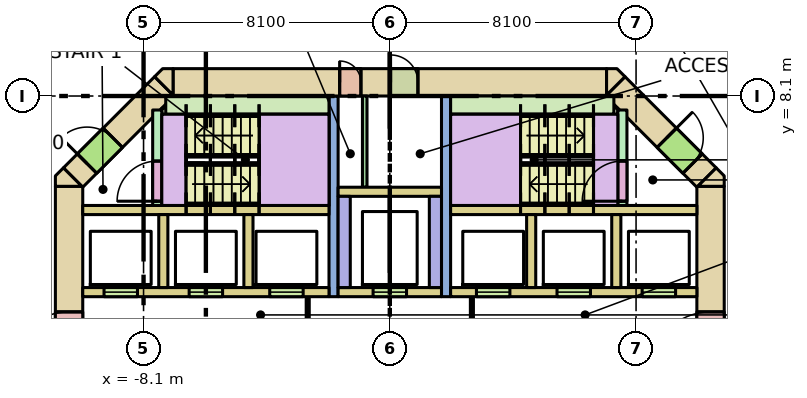
"""IFC4 building model, lengths in metres.
Left out: names, types, materials, properties, quantities, classifications, styles, units other than length and angle.
Written with IfcOpenShell. Run it as: python <this file> out.ifc"""

import sys

from ifc_helpers import new_model, si_unit, direction, frame, frame_2d, origin, place, context, subcontext, project, spatial, polyline, rectangle, outline, extrude, element, fill, save


model = new_model("IFC4")
c1 = context("Model", 3, precision=1e-05, world=origin(), true_north=direction((0.0, 1.0)))
c2 = subcontext(c1, "Body", "Model", "MODEL_VIEW")
j1 = project(units=[si_unit("LENGTHUNIT", "METRE"), si_unit("PLANEANGLEUNIT", "RADIAN")], contexts=[c1])
p1 = place(None, origin())
s1 = spatial("IfcSite", under=j1, at=p1, CompositionType="ELEMENT")
p2 = place(p1, origin())
s2 = spatial("IfcBuilding", under=s1, at=p2, CompositionType="ELEMENT")
p3 = place(p2, origin())
s3 = spatial("IfcBuildingStorey", under=s2, at=p3, CompositionType="ELEMENT", Elevation=0.0)
p4 = place(p3, frame((-7.13, 8.55, -0.32), z_axis=(0.0, 0.0, 1.0), x_axis=(1.0, 0.0, 0.0)))
e1 = element("IfcWall", 1, at=p4, inside=s3, PredefinedType="SHEAR", context=c2, shape_type="SweptSolid", body=[
    extrude(rectangle(XDim=14.26, YDim=0.9, at=frame_2d((7.13, 0.0))), origin(), (0.0, 0.0, 1.0), 6.0),
])
p5 = place(p4, frame((5.48, 0.0, 0.32)))
e2 = element("IfcOpeningElement", 2, at=p5, cuts=e1, PredefinedType="OPENING", context=c2, shape_type="SweptSolid", body=[
    extrude(rectangle(XDim=0.7, YDim=2.1, at=frame_2d((0.35, 1.05))), frame((0.0, 0.46, 0.0), z_axis=(0.0, -1.0, 0.0), x_axis=(1.0, 0.0, 0.0)), (0.0, 0.0, 1.0), 0.92),
])
p6 = place(p4, frame((7.155, 0.0, 0.32)))
e3 = element("IfcOpeningElement", 3, at=p6, cuts=e1, PredefinedType="OPENING", context=c2, shape_type="SweptSolid", body=[
    extrude(rectangle(XDim=0.9, YDim=2.1, at=frame_2d((0.45, 1.05))), frame((0.0, 0.46, 0.0), z_axis=(0.0, -1.0, 0.0), x_axis=(1.0, 0.0, 0.0)), (0.0, 0.0, 1.0), 0.92),
])
p7 = place(p3, frame((-10.55, -5.13, -0.32), z_axis=(0.0, 0.0, 1.0), x_axis=(0.0, 1.0, 0.0)))
e4 = element("IfcWall", 4, at=p7, inside=s3, PredefinedType="SHEAR", context=c2, shape_type="SweptSolid", body=[
    extrude(rectangle(XDim=10.26, YDim=0.9, at=frame_2d((5.13, 0.0))), origin(), (0.0, 0.0, 1.0), 6.0),
])
p8 = place(p7, frame((4.13, 0.0, 0.32)))
e5 = element("IfcOpeningElement", 5, at=p8, cuts=e4, PredefinedType="OPENING", context=c2, shape_type="SweptSolid", body=[
    extrude(rectangle(XDim=2.0, YDim=2.1, at=frame_2d((1.0, 1.05))), frame((0.0, 0.46, 0.0), z_axis=(0.0, -1.0, 0.0), x_axis=(1.0, 0.0, 0.0)), (0.0, 0.0, 1.0), 0.92),
])
p9 = place(p3, frame((10.55, -5.13, -0.32), z_axis=(0.0, 0.0, 1.0), x_axis=(0.0, 1.0, 0.0)))
e6 = element("IfcWall", 6, at=p9, inside=s3, PredefinedType="SHEAR", context=c2, shape_type="SweptSolid", body=[
    extrude(rectangle(XDim=10.26, YDim=0.9, at=frame_2d((5.13, 0.0))), origin(), (0.0, 0.0, 1.0), 6.0),
])
p10 = place(p9, frame((4.13, 0.0, 0.32)))
e7 = element("IfcOpeningElement", 7, at=p10, cuts=e6, PredefinedType="OPENING", context=c2, shape_type="SweptSolid", body=[
    extrude(rectangle(XDim=2.0, YDim=2.1, at=frame_2d((1.0, 1.05))), frame((0.0, 0.46, 0.0), z_axis=(0.0, -1.0, 0.0), x_axis=(1.0, 0.0, 0.0)), (0.0, 0.0, 1.0), 0.92),
])
p11 = place(p3, frame((-10.418, 5.418, -0.32), z_axis=(0.0, 0.0, 1.0), x_axis=(0.707106781187, 0.707106781187, 0.0)))
e8 = element("IfcWall", 8, at=p11, inside=s3, PredefinedType="SHEAR", context=c2, shape_type="SweptSolid", body=[
    extrude(rectangle(XDim=4.243, YDim=0.9, at=frame_2d((2.121, 0.0))), origin(), (0.0, 0.0, 1.0), 6.0),
])
p12 = place(p11, frame((0.65, 0.0, 0.32)))
e9 = element("IfcOpeningElement", 9, at=p12, cuts=e8, PredefinedType="OPENING", context=c2, shape_type="SweptSolid", body=[
    extrude(rectangle(XDim=1.2, YDim=2.1, at=frame_2d((0.6, 1.05))), frame((0.0, 0.46, 0.0), z_axis=(0.0, -1.0, 0.0), x_axis=(1.0, 0.0, 0.0)), (0.0, 0.0, 1.0), 0.92),
])
p13 = place(p3, frame((7.418, 8.418, -0.32), z_axis=(0.0, 0.0, 1.0), x_axis=(0.707106781187, -0.707106781187, 0.0)))
e10 = element("IfcWall", 10, at=p13, inside=s3, PredefinedType="SHEAR", context=c2, shape_type="SweptSolid", body=[
    extrude(rectangle(XDim=4.243, YDim=0.9, at=frame_2d((2.121, 0.0))), origin(), (0.0, 0.0, 1.0), 6.0),
])
p14 = place(p13, frame((2.393, 0.0, 0.32)))
e11 = element("IfcOpeningElement", 11, at=p14, cuts=e10, PredefinedType="OPENING", context=c2, shape_type="SweptSolid", body=[
    extrude(rectangle(XDim=1.2, YDim=2.1, at=frame_2d((0.6, 1.05))), frame((0.0, 0.46, 0.0), z_axis=(0.0, -1.0, 0.0), x_axis=(1.0, 0.0, 0.0)), (0.0, 0.0, 1.0), 0.92),
])
p15 = place(p3, frame((0.0, 0.0, -0.32)))
e12 = element("IfcWall", 12, at=p15, inside=s3, PredefinedType="SHEAR", context=c2, shape_type="SweptSolid", body=[
    extrude(outline(polyline([(-10.736, 5.736), (-10.13, 5.13), (-11.0, 5.13), (-11.0, 5.473), (-10.736, 5.736)])), origin(), (0.0, 0.0, 1.0), 6.0),
])
p16 = place(p3, frame((0.0, 0.0, -0.32)))
e13 = element("IfcWall", 13, at=p16, inside=s3, PredefinedType="SHEAR", context=c2, shape_type="SweptSolid", body=[
    extrude(outline(polyline([(11.0, 5.473), (11.0, 5.13), (10.13, 5.13), (10.736, 5.736), (11.0, 5.473)])), origin(), (0.0, 0.0, 1.0), 6.0),
])
p17 = place(p3, frame((0.0, 0.0, -0.32)))
e14 = element("IfcWall", 14, at=p17, inside=s3, PredefinedType="SHEAR", context=c2, shape_type="SweptSolid", body=[
    extrude(outline(polyline([(-7.473, 9.0), (-7.13, 9.0), (-7.13, 8.13), (-7.736, 8.736), (-7.473, 9.0)])), origin(), (0.0, 0.0, 1.0), 6.0),
])
p18 = place(p3, frame((0.0, 0.0, -0.32)))
e15 = element("IfcWall", 15, at=p18, inside=s3, PredefinedType="SHEAR", context=c2, shape_type="SweptSolid", body=[
    extrude(outline(polyline([(7.473, 9.0), (7.736, 8.736), (7.13, 8.13), (7.13, 9.0), (7.473, 9.0)])), origin(), (0.0, 0.0, 1.0), 6.0),
])
for number, where, z_axis, x_axis in (
    (16, (-10.1, 4.35, 0.0), (0.0, 0.0, 1.0), (1.0, 0.0, 0.0)),
    (17, (2.0, 4.35, 0.0), (0.0, 0.0, 1.0), (1.0, 0.0, 0.0)),
):
    element("IfcWall", number, at=place(p3, frame(where, z_axis=z_axis, x_axis=x_axis)), inside=s3, PredefinedType="SOLIDWALL", context=c2, shape_type="SweptSolid", body=[
        extrude(rectangle(XDim=8.1, YDim=0.3, at=frame_2d((4.05, 0.0))), origin(), (0.0, 0.0, 1.0), 5.68),
    ])
p19 = place(p3, frame((-10.1, 1.65, 0.0), z_axis=(0.0, 0.0, 1.0), x_axis=(1.0, 0.0, 0.0)))
e18 = element("IfcWall", 18, at=p19, inside=s3, PredefinedType="SOLIDWALL", context=c2, shape_type="SweptSolid", body=[
    extrude(rectangle(XDim=8.1, YDim=0.3, at=frame_2d((4.05, 0.0))), origin(), (0.0, 0.0, 1.0), 5.68),
])
p20 = place(p19, frame((0.7, 0.0, 0.0)))
e19 = element("IfcOpeningElement", 19, at=p20, cuts=e18, PredefinedType="OPENING", context=c2, shape_type="SweptSolid", body=[
    extrude(rectangle(XDim=1.1, YDim=2.1, at=frame_2d((0.55, 1.05))), frame((0.0, 0.16, 0.0), z_axis=(0.0, -1.0, 0.0), x_axis=(1.0, 0.0, 0.0)), (0.0, 0.0, 1.0), 0.32),
])
p21 = place(p19, frame((3.5, 0.0, 0.0)))
e20 = element("IfcOpeningElement", 20, at=p21, cuts=e18, PredefinedType="OPENING", context=c2, shape_type="SweptSolid", body=[
    extrude(rectangle(XDim=1.1, YDim=2.1, at=frame_2d((0.55, 1.05))), frame((0.0, 0.16, 0.0), z_axis=(0.0, -1.0, 0.0), x_axis=(1.0, 0.0, 0.0)), (0.0, 0.0, 1.0), 0.32),
])
p22 = place(p19, frame((6.15, 0.0, 0.0)))
e21 = element("IfcOpeningElement", 21, at=p22, cuts=e18, PredefinedType="OPENING", context=c2, shape_type="SweptSolid", body=[
    extrude(rectangle(XDim=1.1, YDim=2.1, at=frame_2d((0.55, 1.05))), frame((0.0, 0.16, 0.0), z_axis=(0.0, -1.0, 0.0), x_axis=(1.0, 0.0, 0.0)), (0.0, 0.0, 1.0), 0.32),
])
p23 = place(p3, frame((2.0, 1.65, 0.0), z_axis=(0.0, 0.0, 1.0), x_axis=(1.0, 0.0, 0.0)))
e22 = element("IfcWall", 22, at=p23, inside=s3, PredefinedType="SOLIDWALL", context=c2, shape_type="SweptSolid", body=[
    extrude(rectangle(XDim=8.1, YDim=0.3, at=frame_2d((4.05, 0.0))), origin(), (0.0, 0.0, 1.0), 5.68),
])
p24 = place(p23, frame((0.85, 0.0, 0.0)))
e23 = element("IfcOpeningElement", 23, at=p24, cuts=e22, PredefinedType="OPENING", context=c2, shape_type="SweptSolid", body=[
    extrude(rectangle(XDim=1.1, YDim=2.1, at=frame_2d((0.55, 1.05))), frame((0.0, 0.16, 0.0), z_axis=(0.0, -1.0, 0.0), x_axis=(1.0, 0.0, 0.0)), (0.0, 0.0, 1.0), 0.32),
])
p25 = place(p23, frame((3.5, 0.0, 0.0)))
e24 = element("IfcOpeningElement", 24, at=p25, cuts=e22, PredefinedType="OPENING", context=c2, shape_type="SweptSolid", body=[
    extrude(rectangle(XDim=1.1, YDim=2.1, at=frame_2d((0.55, 1.05))), frame((0.0, 0.16, 0.0), z_axis=(0.0, -1.0, 0.0), x_axis=(1.0, 0.0, 0.0)), (0.0, 0.0, 1.0), 0.32),
])
p26 = place(p23, frame((6.3, 0.0, 0.0)))
e25 = element("IfcOpeningElement", 25, at=p26, cuts=e22, PredefinedType="OPENING", context=c2, shape_type="SweptSolid", body=[
    extrude(rectangle(XDim=1.1, YDim=2.1, at=frame_2d((0.55, 1.05))), frame((0.0, 0.16, 0.0), z_axis=(0.0, -1.0, 0.0), x_axis=(1.0, 0.0, 0.0)), (0.0, 0.0, 1.0), 0.32),
])
for number, where, z_axis, x_axis in (
    (26, (-7.45, 1.8, 0.0), (0.0, 0.0, 1.0), (0.0, 1.0, 0.0)),
    (27, (-4.65, 1.8, 0.0), (0.0, 0.0, 1.0), (0.0, 1.0, 0.0)),
    (28, (4.65, 1.8, 0.0), (0.0, 0.0, 1.0), (0.0, 1.0, 0.0)),
    (29, (7.45, 1.8, 0.0), (0.0, 0.0, 1.0), (0.0, 1.0, 0.0)),
):
    element("IfcWall", number, at=place(p3, frame(where, z_axis=z_axis, x_axis=x_axis)), inside=s3, PredefinedType="SOLIDWALL", context=c2, shape_type="SweptSolid", body=[
        extrude(rectangle(XDim=2.4, YDim=0.3, at=frame_2d((1.2, 0.0))), origin(), (0.0, 0.0, 1.0), 5.68),
    ])
for number, where, z_axis, x_axis in (
    (30, (-1.85, 1.5, 0.0), (0.0, 0.0, 1.0), (0.0, 1.0, 0.0)),
    (31, (1.85, 1.5, 0.0), (0.0, 0.0, 1.0), (0.0, 1.0, 0.0)),
):
    element("IfcWall", number, at=place(p3, frame(where, z_axis=z_axis, x_axis=x_axis)), inside=s3, PredefinedType="SHEAR", context=c2, shape_type="SweptSolid", body=[
        extrude(rectangle(XDim=6.6, YDim=0.3, at=frame_2d((3.3, 0.0))), origin(), (0.0, 0.0, 1.0), 5.68),
    ])
p27 = place(p3, frame((-1.7, 1.65, 0.0), z_axis=(0.0, 0.0, 1.0), x_axis=(1.0, 0.0, 0.0)))
e32 = element("IfcWall", 32, at=p27, inside=s3, PredefinedType="SOLIDWALL", context=c2, shape_type="SweptSolid", body=[
    extrude(rectangle(XDim=3.4, YDim=0.3, at=frame_2d((1.7, 0.0))), origin(), (0.0, 0.0, 1.0), 5.68),
])
p28 = place(p27, frame((1.15, 0.0, 0.0)))
e33 = element("IfcOpeningElement", 33, at=p28, cuts=e32, PredefinedType="OPENING", context=c2, shape_type="SweptSolid", body=[
    extrude(rectangle(XDim=1.1, YDim=2.1, at=frame_2d((0.55, 1.05))), frame((0.0, 0.16, 0.0), z_axis=(0.0, -1.0, 0.0), x_axis=(1.0, 0.0, 0.0)), (0.0, 0.0, 1.0), 0.32),
])
for number, where, z_axis, x_axis in (
    (34, (-1.5, 1.8, 0.0), (0.0, 0.0, 1.0), (0.0, 1.0, 0.0)),
    (35, (1.5, 1.8, 0.0), (0.0, 0.0, 1.0), (0.0, 1.0, 0.0)),
):
    element("IfcWall", number, at=place(p3, frame(where, z_axis=z_axis, x_axis=x_axis)), inside=s3, PredefinedType="SOLIDWALL", context=c2, shape_type="SweptSolid", body=[
        extrude(rectangle(XDim=3.0, YDim=0.4, at=frame_2d((1.5, 0.0))), origin(), (0.0, 0.0, 1.0), 5.68),
    ])
p29 = place(p3, frame((-1.7, 4.95, 0.0), z_axis=(0.0, 0.0, 1.0), x_axis=(1.0, 0.0, 0.0)))
e36 = element("IfcWall", 36, at=p29, inside=s3, PredefinedType="SOLIDWALL", context=c2, shape_type="SweptSolid", body=[
    extrude(rectangle(XDim=3.4, YDim=0.3, at=frame_2d((1.7, 0.0))), origin(), (0.0, 0.0, 1.0), 5.68),
])
p30 = place(p3, frame((-7.65, 4.5, 0.0), z_axis=(0.0, 0.0, 1.0), x_axis=(0.0, 1.0, 0.0)))
e37 = element("IfcWall", 37, at=p30, inside=s3, PredefinedType="SHEAR", context=c2, shape_type="SweptSolid", body=[
    extrude(rectangle(XDim=3.14, YDim=0.3, at=frame_2d((1.57, 0.0))), origin(), (0.0, 0.0, 1.0), 5.68),
])
p31 = place(p30, frame((0.14, 0.0, 0.0)))
e38 = element("IfcOpeningElement", 38, at=p31, cuts=e37, PredefinedType="OPENING", context=c2, shape_type="SweptSolid", body=[
    extrude(rectangle(XDim=1.32, YDim=2.1, at=frame_2d((0.66, 1.05))), frame((0.0, 0.16, 0.0), z_axis=(0.0, -1.0, 0.0), x_axis=(1.0, 0.0, 0.0)), (0.0, 0.0, 1.0), 0.32),
])
p32 = place(p3, frame((-7.37, 7.8, 0.0), z_axis=(0.0, 0.0, 1.0), x_axis=(1.0, 0.0, 0.0)))
e39 = element("IfcWall", 39, at=p32, inside=s3, PredefinedType="SHEAR", context=c2, shape_type="SweptSolid", body=[
    extrude(rectangle(XDim=5.37, YDim=0.6, at=frame_2d((2.685, 0.0))), origin(), (0.0, 0.0, 1.0), 5.68),
])
p33 = place(p3, frame((7.65, 4.5, 0.0), z_axis=(0.0, 0.0, 1.0), x_axis=(0.0, 1.0, 0.0)))
e40 = element("IfcWall", 40, at=p33, inside=s3, PredefinedType="SHEAR", context=c2, shape_type="SweptSolid", body=[
    extrude(rectangle(XDim=3.14, YDim=0.3, at=frame_2d((1.57, 0.0))), origin(), (0.0, 0.0, 1.0), 5.68),
])
p34 = place(p33, frame((0.14, 0.0, 0.0)))
e41 = element("IfcOpeningElement", 41, at=p34, cuts=e40, PredefinedType="OPENING", context=c2, shape_type="SweptSolid", body=[
    extrude(rectangle(XDim=1.32, YDim=2.1, at=frame_2d((0.66, 1.05))), frame((0.0, 0.16, 0.0), z_axis=(0.0, -1.0, 0.0), x_axis=(1.0, 0.0, 0.0)), (0.0, 0.0, 1.0), 0.32),
])
p35 = place(p3, frame((2.0, 7.8, 0.0), z_axis=(0.0, 0.0, 1.0), x_axis=(1.0, 0.0, 0.0)))
e42 = element("IfcWall", 42, at=p35, inside=s3, PredefinedType="SHEAR", context=c2, shape_type="SweptSolid", body=[
    extrude(rectangle(XDim=5.37, YDim=0.6, at=frame_2d((2.685, 0.0))), origin(), (0.0, 0.0, 1.0), 5.68),
])
for number, where, z_axis, x_axis in (
    (43, (-7.5, 7.6, 0.0), (0.0, 0.0, 1.0), (1.0, 0.0, 0.0)),
    (44, (6.9, 7.6, 0.0), (0.0, 0.0, 1.0), (1.0, 0.0, 0.0)),
):
    element("IfcWall", number, at=place(p3, frame(where, z_axis=z_axis, x_axis=x_axis)), inside=s3, PredefinedType="SHEAR", context=c2, shape_type="SweptSolid", body=[
        extrude(rectangle(XDim=0.6, YDim=0.2, at=frame_2d((0.3, 0.0))), origin(), (0.0, 0.0, 1.0), 5.68),
    ])
p36 = place(p3, frame((-2.7, -1.5, 0.0), z_axis=(0.0, 0.0, 1.0), x_axis=(0.0, 1.0, 0.0)))
e45 = element("IfcWall", 45, at=p36, inside=s3, PredefinedType="PARTITIONING", context=c2, shape_type="SweptSolid", body=[
    extrude(rectangle(XDim=3.0, YDim=0.1, at=frame_2d((1.5, 0.0))), origin(), (0.0, 0.0, 1.0), 5.68),
])
p37 = place(p36, frame((0.9, 0.0, 0.0)))
e46 = element("IfcOpeningElement", 46, at=p37, cuts=e45, PredefinedType="OPENING", context=c2, shape_type="SweptSolid", body=[
    extrude(rectangle(XDim=1.2, YDim=2.1, at=frame_2d((0.6, 1.05))), frame((0.0, 0.06, 0.0), z_axis=(0.0, -1.0, 0.0), x_axis=(1.0, 0.0, 0.0)), (0.0, 0.0, 1.0), 0.12),
])
p38 = place(p3, frame((2.7, -1.5, 0.0), z_axis=(0.0, 0.0, 1.0), x_axis=(0.0, 1.0, 0.0)))
e47 = element("IfcWall", 47, at=p38, inside=s3, PredefinedType="PARTITIONING", context=c2, shape_type="SweptSolid", body=[
    extrude(rectangle(XDim=3.0, YDim=0.1, at=frame_2d((1.5, 0.0))), origin(), (0.0, 0.0, 1.0), 5.68),
])
p39 = place(p38, frame((0.9, 0.0, 0.0)))
e48 = element("IfcOpeningElement", 48, at=p39, cuts=e47, PredefinedType="OPENING", context=c2, shape_type="SweptSolid", body=[
    extrude(rectangle(XDim=1.2, YDim=2.1, at=frame_2d((0.6, 1.05))), frame((0.0, 0.06, 0.0), z_axis=(0.0, -1.0, 0.0), x_axis=(1.0, 0.0, 0.0)), (0.0, 0.0, 1.0), 0.12),
])
p40 = place(p3, frame((-0.825, 5.1, 0.0), z_axis=(0.0, 0.0, 1.0), x_axis=(0.0, 1.0, 0.0)))
e49 = element("IfcWall", 49, at=p40, inside=s3, PredefinedType="PARTITIONING", context=c2, shape_type="SweptSolid", body=[
    extrude(rectangle(XDim=3.0, YDim=0.15, at=frame_2d((1.5, 0.0))), origin(), (0.0, 0.0, 1.0), 5.68),
])
p41 = place(p20, origin())
e50 = element("IfcDoor", 50, at=p41, inside=s3, OperationType="DOUBLE_DOOR_SLIDING", PredefinedType="DOOR", context=c2, shape_type="SweptSolid", body=[
    extrude(rectangle(XDim=1.1, YDim=2.1, at=frame_2d((0.55, 1.05))), frame((0.0, 0.025, 0.0), z_axis=(0.0, -1.0, 0.0), x_axis=(1.0, 0.0, 0.0)), (0.0, 0.0, 1.0), 0.05),
])
fill(e19, e50)
p42 = place(p21, origin())
e51 = element("IfcDoor", 51, at=p42, inside=s3, OperationType="DOUBLE_DOOR_SLIDING", PredefinedType="DOOR", context=c2, shape_type="SweptSolid", body=[
    extrude(rectangle(XDim=1.1, YDim=2.1, at=frame_2d((0.55, 1.05))), frame((0.0, 0.025, 0.0), z_axis=(0.0, -1.0, 0.0), x_axis=(1.0, 0.0, 0.0)), (0.0, 0.0, 1.0), 0.05),
])
fill(e20, e51)
p43 = place(p22, origin())
e52 = element("IfcDoor", 52, at=p43, inside=s3, OperationType="DOUBLE_DOOR_SLIDING", PredefinedType="DOOR", context=c2, shape_type="SweptSolid", body=[
    extrude(rectangle(XDim=1.1, YDim=2.1, at=frame_2d((0.55, 1.05))), frame((0.0, 0.025, 0.0), z_axis=(0.0, -1.0, 0.0), x_axis=(1.0, 0.0, 0.0)), (0.0, 0.0, 1.0), 0.05),
])
fill(e21, e52)
p44 = place(p24, origin())
e53 = element("IfcDoor", 53, at=p44, inside=s3, OperationType="DOUBLE_DOOR_SLIDING", PredefinedType="DOOR", context=c2, shape_type="SweptSolid", body=[
    extrude(rectangle(XDim=1.1, YDim=2.1, at=frame_2d((0.55, 1.05))), frame((0.0, 0.025, 0.0), z_axis=(0.0, -1.0, 0.0), x_axis=(1.0, 0.0, 0.0)), (0.0, 0.0, 1.0), 0.05),
])
fill(e23, e53)
p45 = place(p25, origin())
e54 = element("IfcDoor", 54, at=p45, inside=s3, OperationType="DOUBLE_DOOR_SLIDING", PredefinedType="DOOR", context=c2, shape_type="SweptSolid", body=[
    extrude(rectangle(XDim=1.1, YDim=2.1, at=frame_2d((0.55, 1.05))), frame((0.0, 0.025, 0.0), z_axis=(0.0, -1.0, 0.0), x_axis=(1.0, 0.0, 0.0)), (0.0, 0.0, 1.0), 0.05),
])
fill(e24, e54)
p46 = place(p26, origin())
e55 = element("IfcDoor", 55, at=p46, inside=s3, OperationType="DOUBLE_DOOR_SLIDING", PredefinedType="DOOR", context=c2, shape_type="SweptSolid", body=[
    extrude(rectangle(XDim=1.1, YDim=2.1, at=frame_2d((0.55, 1.05))), frame((0.0, 0.025, 0.0), z_axis=(0.0, -1.0, 0.0), x_axis=(1.0, 0.0, 0.0)), (0.0, 0.0, 1.0), 0.05),
])
fill(e25, e55)
p47 = place(p28, origin())
e56 = element("IfcDoor", 56, at=p47, inside=s3, OperationType="DOUBLE_DOOR_SLIDING", PredefinedType="DOOR", context=c2, shape_type="SweptSolid", body=[
    extrude(rectangle(XDim=1.1, YDim=2.1, at=frame_2d((0.55, 1.05))), frame((0.0, 0.025, 0.0), z_axis=(0.0, -1.0, 0.0), x_axis=(1.0, 0.0, 0.0)), (0.0, 0.0, 1.0), 0.05),
])
fill(e33, e56)
p48 = place(p31, origin())
e57 = element("IfcDoor", 57, at=p48, inside=s3, OperationType="DOUBLE_DOOR_SINGLE_SWING", PredefinedType="DOOR", context=c2, shape_type="SweptSolid", body=[
    extrude(rectangle(XDim=1.32, YDim=2.1, at=frame_2d((0.66, 1.05))), frame((0.0, 0.025, 0.0), z_axis=(0.0, -1.0, 0.0), x_axis=(1.0, 0.0, 0.0)), (0.0, 0.0, 1.0), 0.05),
])
fill(e38, e57)
p49 = place(p12, origin())
e58 = element("IfcDoor", 58, at=p49, inside=s3, OperationType="SINGLE_SWING_LEFT", PredefinedType="DOOR", context=c2, shape_type="SweptSolid", body=[
    extrude(rectangle(XDim=1.2, YDim=2.1, at=frame_2d((0.6, 1.05))), frame((0.0, 0.025, 0.0), z_axis=(0.0, -1.0, 0.0), x_axis=(1.0, 0.0, 0.0)), (0.0, 0.0, 1.0), 0.05),
])
fill(e9, e58)
p50 = place(p34, origin())
e59 = element("IfcDoor", 59, at=p50, inside=s3, OperationType="DOUBLE_DOOR_SINGLE_SWING", PredefinedType="DOOR", context=c2, shape_type="SweptSolid", body=[
    extrude(rectangle(XDim=1.32, YDim=2.1, at=frame_2d((0.66, 1.05))), frame((0.0, 0.025, 0.0), z_axis=(0.0, -1.0, 0.0), x_axis=(1.0, 0.0, 0.0)), (0.0, 0.0, 1.0), 0.05),
])
fill(e41, e59)
p51 = place(p14, origin())
e60 = element("IfcDoor", 60, at=p51, inside=s3, OperationType="SINGLE_SWING_LEFT", PredefinedType="DOOR", context=c2, shape_type="SweptSolid", body=[
    extrude(rectangle(XDim=1.2, YDim=2.1, at=frame_2d((0.6, 1.05))), frame((0.0, 0.025, 0.0), z_axis=(0.0, -1.0, 0.0), x_axis=(1.0, 0.0, 0.0)), (0.0, 0.0, 1.0), 0.05),
])
fill(e11, e60)
p52 = place(p8, origin())
e61 = element("IfcDoor", 61, at=p52, inside=s3, OperationType="DOUBLE_DOOR_SINGLE_SWING", PredefinedType="DOOR", context=c2, shape_type="SweptSolid", body=[
    extrude(rectangle(XDim=2.0, YDim=2.1, at=frame_2d((1.0, 1.05))), frame((0.0, 0.025, 0.0), z_axis=(0.0, -1.0, 0.0), x_axis=(1.0, 0.0, 0.0)), (0.0, 0.0, 1.0), 0.05),
])
fill(e5, e61)
p53 = place(p10, origin())
e62 = element("IfcDoor", 62, at=p53, inside=s3, OperationType="DOUBLE_DOOR_SINGLE_SWING", PredefinedType="DOOR", context=c2, shape_type="SweptSolid", body=[
    extrude(rectangle(XDim=2.0, YDim=2.1, at=frame_2d((1.0, 1.05))), frame((0.0, 0.025, 0.0), z_axis=(0.0, -1.0, 0.0), x_axis=(1.0, 0.0, 0.0)), (0.0, 0.0, 1.0), 0.05),
])
fill(e7, e62)
p54 = place(p5, origin())
e63 = element("IfcDoor", 63, at=p54, inside=s3, OperationType="SINGLE_SWING_LEFT", PredefinedType="DOOR", context=c2, shape_type="SweptSolid", body=[
    extrude(rectangle(XDim=0.7, YDim=2.1, at=frame_2d((0.35, 1.05))), frame((0.0, 0.025, 0.0), z_axis=(0.0, -1.0, 0.0), x_axis=(1.0, 0.0, 0.0)), (0.0, 0.0, 1.0), 0.05),
])
fill(e2, e63)
p55 = place(p6, origin())
e64 = element("IfcDoor", 64, at=p55, inside=s3, OperationType="SINGLE_SWING_LEFT", PredefinedType="DOOR", context=c2, shape_type="SweptSolid", body=[
    extrude(rectangle(XDim=0.9, YDim=2.1, at=frame_2d((0.45, 1.05))), frame((0.0, 0.025, 0.0), z_axis=(0.0, -1.0, 0.0), x_axis=(1.0, 0.0, 0.0)), (0.0, 0.0, 1.0), 0.05),
])
fill(e3, e64)
save(model, sys.argv[1])
